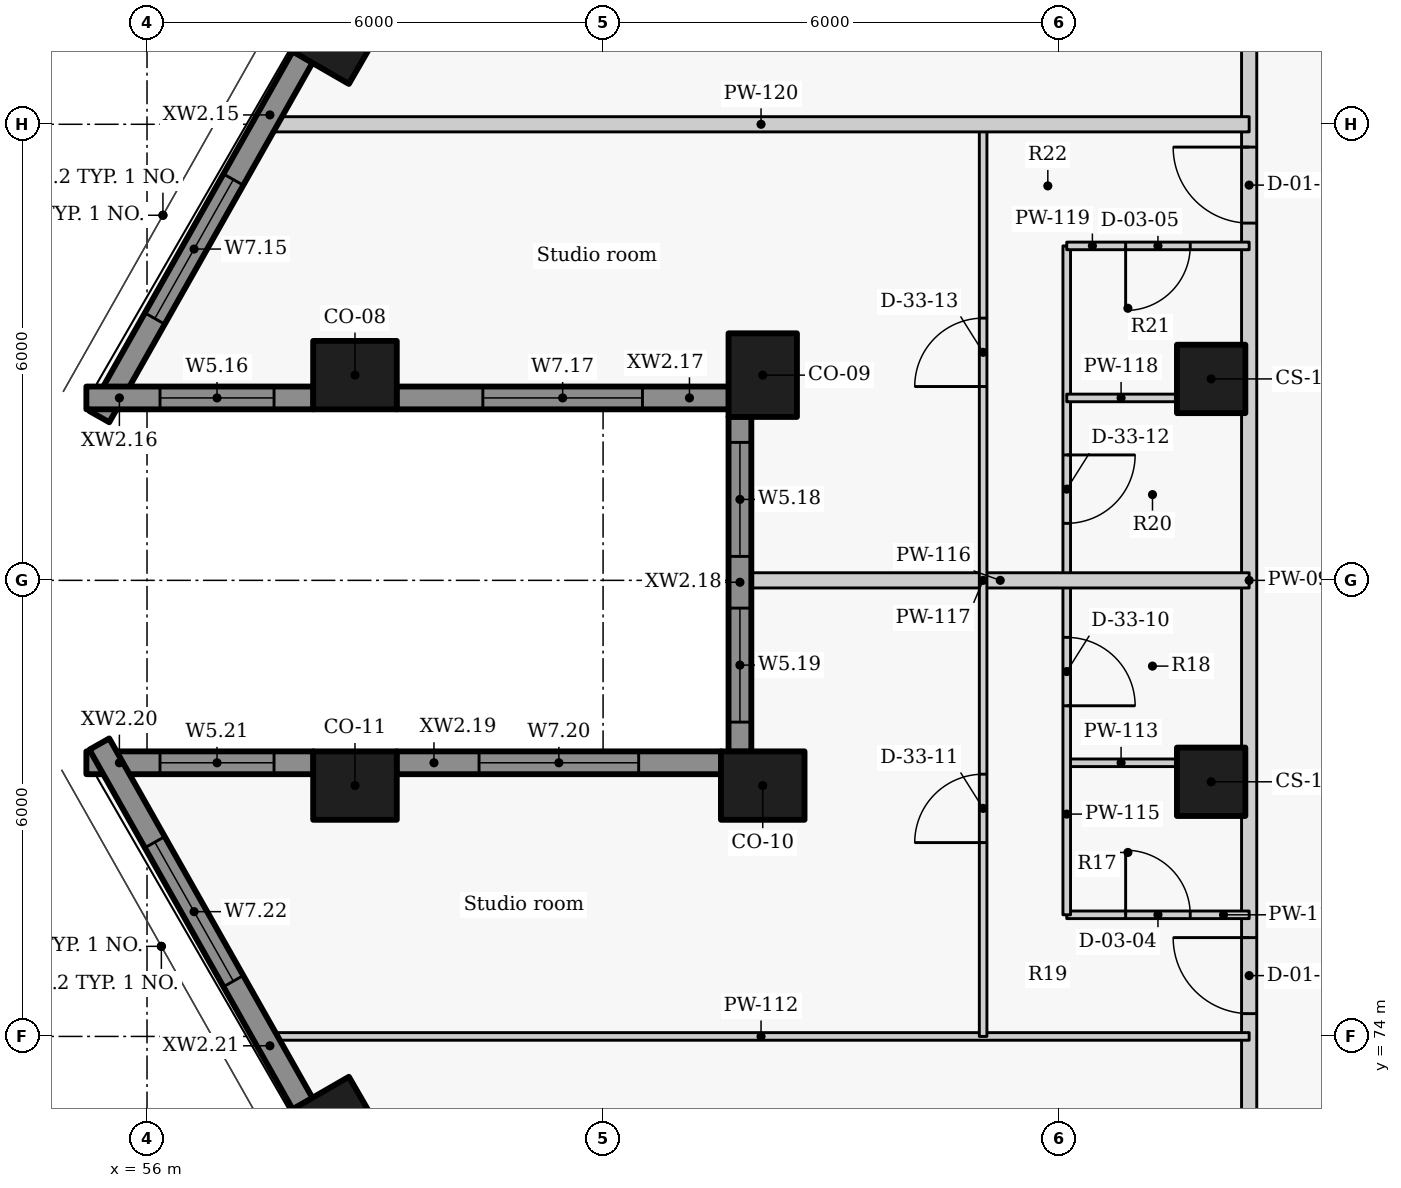
"""IFC4 building model, lengths in metres.
Left out: names, types, materials, properties, quantities, classifications, styles, units other than length and angle.
Written with IfcOpenShell. Run it as: python <this file> out.ifc"""

import sys

from ifc_helpers import new_model, si_unit, direction, frame, frame_2d, origin, origin_2d, place, context, subcontext, project, spatial, rectangle, extrude, element, fill, save


model = new_model("IFC4")
c1 = context("Model", 3, precision=1e-05, world=origin(), true_north=direction((0.0, 1.0)))
c2 = subcontext(c1, "Body", "Model", "MODEL_VIEW")
j1 = project(units=[si_unit("LENGTHUNIT", "METRE"), si_unit("PLANEANGLEUNIT", "RADIAN")], contexts=[c1])
p1 = place(None, origin())
s1 = spatial("IfcSite", under=j1, at=p1, CompositionType="ELEMENT")
p2 = place(p1, origin())
s2 = spatial("IfcBuilding", under=s1, at=p2, CompositionType="ELEMENT")
p3 = place(p2, frame((0.0, 0.0, 249.3)))
s3 = spatial("IfcBuildingStorey", under=s2, at=p3, CompositionType="ELEMENT", Elevation=249.3)
for number, where, z_axis, x_axis in (
    (1, (58.541, 87.232, 0.0), (0.0, 0.0, 1.0), (-0.5, -0.866, 0.0)),
    (2, (58.736, 82.7, 0.0), (0.0, 0.0, 1.0), (1.0, 0.0, 0.0)),
    (3, (64.101, 82.7, 0.0), (0.0, 0.0, 1.0), (0.0, -1.0, 0.0)),
    (4, (64.101, 77.3, 0.0), (0.0, 0.0, 1.0), (-1.0, 0.0, 0.0)),
    (5, (58.736, 77.3, 0.0), (0.0, 0.0, 1.0), (-1.0, 0.0, 0.0)),
    (6, (58.541, 72.768, 0.0), (0.0, 0.0, 1.0), (0.5, -0.866, 0.0)),
):
    element("IfcColumn", number, at=place(p3, frame(where, z_axis=z_axis, x_axis=x_axis)), inside=s3, PredefinedType="COLUMN", context=c2, shape_type="SweptSolid", body=[
        extrude(rectangle(XDim=1.1, YDim=0.9, at=origin_2d()), origin(), (0.0, 0.0, 1.0), 3.3),
    ])
for number, where, z_axis, x_axis in (
    (7, (70.0, 82.65, 0.0), (0.0, 0.0, 1.0), (0.0, -1.0, 0.0)),
    (8, (70.0, 77.35, 0.0), (0.0, 0.0, 1.0), (0.0, -1.0, 0.0)),
):
    element("IfcColumn", number, at=place(p3, frame(where, z_axis=z_axis, x_axis=x_axis)), inside=s3, PredefinedType="COLUMN", context=c2, shape_type="SweptSolid", body=[
        extrude(rectangle(XDim=0.9, YDim=0.9, at=origin_2d()), origin(), (0.0, 0.0, 1.0), 3.3),
    ])
p4 = place(p3, frame((58.048, 86.886, 0.0), z_axis=(0.0, 0.0, 1.0), x_axis=(-0.492080931903, -0.870549456641, 0.0)))
e9 = element("IfcWall", 9, at=p4, inside=s3, PredefinedType="SOLIDWALL", context=c2, shape_type="SweptSolid", body=[
    extrude(rectangle(XDim=5.437, YDim=0.3, at=frame_2d((2.718, 0.0))), origin(), (0.0, 0.0, 1.0), 2.425),
])
p5 = place(p4, frame((1.854, 0.0, 0.9)))
e10 = element("IfcOpeningElement", 10, at=p5, cuts=e9, PredefinedType="OPENING", context=c2, shape_type="SweptSolid", body=[
    extrude(rectangle(XDim=2.1, YDim=1.1, at=frame_2d((1.05, 0.55))), frame((0.0, 0.16, 0.0), z_axis=(0.0, -1.0, 0.0), x_axis=(1.0, 0.0, 0.0)), (0.0, 0.0, 1.0), 0.32),
])
p6 = place(p3, frame((55.202, 82.4, 0.0), z_axis=(0.0, 0.0, 1.0), x_axis=(1.0, 0.0, 0.0)))
e11 = element("IfcWall", 11, at=p6, inside=s3, PredefinedType="SOLIDWALL", context=c2, shape_type="SweptSolid", body=[
    extrude(rectangle(XDim=2.988, YDim=0.3, at=frame_2d((1.494, 0.0))), origin(), (0.0, 0.0, 1.0), 2.425),
])
p7 = place(p6, frame((0.969, 0.0, 0.9)))
e12 = element("IfcOpeningElement", 12, at=p7, cuts=e11, PredefinedType="OPENING", context=c2, shape_type="SweptSolid", body=[
    extrude(rectangle(XDim=1.5, YDim=1.1, at=frame_2d((0.75, 0.55))), frame((0.0, 0.16, 0.0), z_axis=(0.0, -1.0, 0.0), x_axis=(1.0, 0.0, 0.0)), (0.0, 0.0, 1.0), 0.32),
])
p8 = place(p3, frame((59.282, 82.4, 0.0), z_axis=(0.0, 0.0, 1.0), x_axis=(1.0, 0.0, 0.0)))
e13 = element("IfcWall", 13, at=p8, inside=s3, PredefinedType="SOLIDWALL", context=c2, shape_type="SweptSolid", body=[
    extrude(rectangle(XDim=4.373, YDim=0.3, at=frame_2d((2.186, 0.0))), origin(), (0.0, 0.0, 1.0), 2.425),
])
p9 = place(p8, frame((1.136, 0.0, 0.9)))
e14 = element("IfcOpeningElement", 14, at=p9, cuts=e13, PredefinedType="OPENING", context=c2, shape_type="SweptSolid", body=[
    extrude(rectangle(XDim=2.1, YDim=1.1, at=frame_2d((1.05, 0.55))), frame((0.0, 0.16, 0.0), z_axis=(0.0, -1.0, 0.0), x_axis=(1.0, 0.0, 0.0)), (0.0, 0.0, 1.0), 0.32),
])
p10 = place(p3, frame((63.801, 82.154, 0.0), z_axis=(0.0, 0.0, 1.0), x_axis=(0.0, -1.0, 0.0)))
e15 = element("IfcWall", 15, at=p10, inside=s3, PredefinedType="SOLIDWALL", context=c2, shape_type="SweptSolid", body=[
    extrude(rectangle(XDim=4.408, YDim=0.3, at=frame_2d((2.204, 0.0))), origin(), (0.0, 0.0, 1.0), 2.425),
])
p11 = place(p10, frame((0.339, 0.0, 0.9)))
e16 = element("IfcOpeningElement", 16, at=p11, cuts=e15, PredefinedType="OPENING", context=c2, shape_type="SweptSolid", body=[
    extrude(rectangle(XDim=1.5, YDim=1.1, at=frame_2d((0.75, 0.55))), frame((0.0, 0.16, 0.0), z_axis=(0.0, -1.0, 0.0), x_axis=(1.0, 0.0, 0.0)), (0.0, 0.0, 1.0), 0.32),
])
p12 = place(p10, frame((2.519, 0.0, 0.9)))
e17 = element("IfcOpeningElement", 17, at=p12, cuts=e15, PredefinedType="OPENING", context=c2, shape_type="SweptSolid", body=[
    extrude(rectangle(XDim=1.5, YDim=1.1, at=frame_2d((0.75, 0.55))), frame((0.0, 0.16, 0.0), z_axis=(0.0, -1.0, 0.0), x_axis=(1.0, 0.0, 0.0)), (0.0, 0.0, 1.0), 0.32),
])
p13 = place(p3, frame((63.554, 77.6, 0.0), z_axis=(0.0, 0.0, 1.0), x_axis=(-1.0, 0.0, 0.0)))
e18 = element("IfcWall", 18, at=p13, inside=s3, PredefinedType="SOLIDWALL", context=c2, shape_type="SweptSolid", body=[
    extrude(rectangle(XDim=4.272, YDim=0.3, at=frame_2d((2.136, 0.0))), origin(), (0.0, 0.0, 1.0), 2.425),
])
p14 = place(p13, frame((1.086, 0.0, 0.9)))
e19 = element("IfcOpeningElement", 19, at=p14, cuts=e18, PredefinedType="OPENING", context=c2, shape_type="SweptSolid", body=[
    extrude(rectangle(XDim=2.1, YDim=1.1, at=frame_2d((1.05, 0.55))), frame((0.0, 0.16, 0.0), z_axis=(0.0, -1.0, 0.0), x_axis=(1.0, 0.0, 0.0)), (0.0, 0.0, 1.0), 0.32),
])
p15 = place(p3, frame((58.19, 77.6, 0.0), z_axis=(0.0, 0.0, 1.0), x_axis=(-1.0, 0.0, 0.0)))
e20 = element("IfcWall", 20, at=p15, inside=s3, PredefinedType="SOLIDWALL", context=c2, shape_type="SweptSolid", body=[
    extrude(rectangle(XDim=2.988, YDim=0.3, at=frame_2d((1.494, 0.0))), origin(), (0.0, 0.0, 1.0), 2.425),
])
p16 = place(p15, frame((0.519, 0.0, 0.9)))
e21 = element("IfcOpeningElement", 21, at=p16, cuts=e20, PredefinedType="OPENING", context=c2, shape_type="SweptSolid", body=[
    extrude(rectangle(XDim=1.5, YDim=1.1, at=frame_2d((0.75, 0.55))), frame((0.0, 0.16, 0.0), z_axis=(0.0, -1.0, 0.0), x_axis=(1.0, 0.0, 0.0)), (0.0, 0.0, 1.0), 0.32),
])
p17 = place(p3, frame((55.373, 77.846, 0.0), z_axis=(0.0, 0.0, 1.0), x_axis=(0.492080931903, -0.870549456641, 0.0)))
e22 = element("IfcWall", 22, at=p17, inside=s3, PredefinedType="SOLIDWALL", context=c2, shape_type="SweptSolid", body=[
    extrude(rectangle(XDim=5.437, YDim=0.3, at=frame_2d((2.718, 0.0))), origin(), (0.0, 0.0, 1.0), 2.425),
])
p18 = place(p17, frame((1.483, 0.0, 0.9)))
e23 = element("IfcOpeningElement", 23, at=p18, cuts=e22, PredefinedType="OPENING", context=c2, shape_type="SweptSolid", body=[
    extrude(rectangle(XDim=2.1, YDim=1.1, at=frame_2d((1.05, 0.55))), frame((0.0, 0.16, 0.0), z_axis=(0.0, -1.0, 0.0), x_axis=(1.0, 0.0, 0.0)), (0.0, 0.0, 1.0), 0.32),
])
p19 = place(p3, frame((70.5, 72.577, 0.0), z_axis=(0.0, 0.0, 1.0), x_axis=(0.0, 1.0, 0.0)))
e24 = element("IfcWall", 24, at=p19, inside=s3, PredefinedType="PARTITIONING", context=c2, shape_type="SweptSolid", body=[
    extrude(rectangle(XDim=15.786, YDim=0.2, at=frame_2d((7.893, 0.0))), origin(), (0.0, 0.0, 1.0), 3.025),
])
p20 = place(p19, frame((1.723, 0.0, 0.0)))
e25 = element("IfcOpeningElement", 25, at=p20, cuts=e24, PredefinedType="OPENING", context=c2, shape_type="SweptSolid", body=[
    extrude(rectangle(XDim=1.0, YDim=2.1, at=frame_2d((0.5, 1.05))), frame((0.0, 0.11, 0.0), z_axis=(0.0, -1.0, 0.0), x_axis=(1.0, 0.0, 0.0)), (0.0, 0.0, 1.0), 0.22),
])
p21 = place(p19, frame((12.123, 0.0, 0.0)))
e26 = element("IfcOpeningElement", 26, at=p21, cuts=e24, PredefinedType="OPENING", context=c2, shape_type="SweptSolid", body=[
    extrude(rectangle(XDim=1.0, YDim=2.1, at=frame_2d((0.5, 1.05))), frame((0.0, 0.11, 0.0), z_axis=(0.0, -1.0, 0.0), x_axis=(1.0, 0.0, 0.0)), (0.0, 0.0, 1.0), 0.22),
])
p22 = place(p3, frame((57.656, 74.0, 0.0), z_axis=(0.0, 0.0, 1.0), x_axis=(1.0, 0.0, 0.0)))
e27 = element("IfcWall", 27, at=p22, inside=s3, PredefinedType="PARTITIONING", context=c2, shape_type="SweptSolid", body=[
    extrude(rectangle(XDim=12.844, YDim=0.1, at=frame_2d((6.422, 0.0))), origin(), (0.0, 0.0, 1.0), 2.405),
])
p23 = place(p3, frame((68.1, 77.6, 0.0), z_axis=(0.0, 0.0, 1.0), x_axis=(1.0, 0.0, 0.0)))
e28 = element("IfcWall", 28, at=p23, inside=s3, PredefinedType="PARTITIONING", context=c2, shape_type="SweptSolid", body=[
    extrude(rectangle(XDim=1.43, YDim=0.1, at=frame_2d((0.715, 0.0))), origin(), (0.0, 0.0, 1.0), 3.025),
])
p24 = place(p3, frame((68.1, 75.6, 0.0), z_axis=(0.0, 0.0, 1.0), x_axis=(1.0, 0.0, 0.0)))
e29 = element("IfcWall", 29, at=p24, inside=s3, PredefinedType="PARTITIONING", context=c2, shape_type="SweptSolid", body=[
    extrude(rectangle(XDim=2.4, YDim=0.1, at=frame_2d((1.2, 0.0))), origin(), (0.0, 0.0, 1.0), 2.505),
])
p25 = place(p24, frame((0.775, 0.0, 0.0)))
e30 = element("IfcOpeningElement", 30, at=p25, cuts=e29, PredefinedType="OPENING", context=c2, shape_type="SweptSolid", body=[
    extrude(rectangle(XDim=0.85, YDim=2.1, at=frame_2d((0.425, 1.05))), frame((0.0, 0.06, 0.0), z_axis=(0.0, -1.0, 0.0), x_axis=(1.0, 0.0, 0.0)), (0.0, 0.0, 1.0), 0.12),
])
p26 = place(p3, frame((68.1, 84.4, 0.0), z_axis=(0.0, 0.0, 1.0), x_axis=(0.0, -1.0, 0.0)))
e31 = element("IfcWall", 31, at=p26, inside=s3, PredefinedType="PARTITIONING", context=c2, shape_type="SweptSolid", body=[
    extrude(rectangle(XDim=8.8, YDim=0.1, at=frame_2d((4.4, 0.0))), origin(), (0.0, 0.0, 1.0), 3.025),
])
p27 = place(p26, frame((5.15, 0.0, 0.0)))
e32 = element("IfcOpeningElement", 32, at=p27, cuts=e31, PredefinedType="OPENING", context=c2, shape_type="SweptSolid", body=[
    extrude(rectangle(XDim=0.9, YDim=2.1, at=frame_2d((0.45, 1.05))), frame((0.0, 0.06, 0.0), z_axis=(0.0, -1.0, 0.0), x_axis=(1.0, 0.0, 0.0)), (0.0, 0.0, 1.0), 0.12),
])
p28 = place(p26, frame((2.75, 0.0, 0.0)))
e33 = element("IfcOpeningElement", 33, at=p28, cuts=e31, PredefinedType="OPENING", context=c2, shape_type="SweptSolid", body=[
    extrude(rectangle(XDim=0.9, YDim=2.1, at=frame_2d((0.45, 1.05))), frame((0.0, 0.06, 0.0), z_axis=(0.0, -1.0, 0.0), x_axis=(1.0, 0.0, 0.0)), (0.0, 0.0, 1.0), 0.12),
])
p29 = place(p3, frame((63.95, 80.0, 0.0), z_axis=(0.0, 0.0, 1.0), x_axis=(1.0, 0.0, 0.0)))
e34 = element("IfcWall", 34, at=p29, inside=s3, PredefinedType="PARTITIONING", context=c2, shape_type="SweptSolid", body=[
    extrude(rectangle(XDim=6.55, YDim=0.2, at=frame_2d((3.275, 0.0))), origin(), (0.0, 0.0, 1.0), 2.405),
])
p30 = place(p3, frame((67.0, 74.0, 0.0), z_axis=(0.0, 0.0, 1.0), x_axis=(0.0, 1.0, 0.0)))
e35 = element("IfcWall", 35, at=p30, inside=s3, PredefinedType="PARTITIONING", context=c2, shape_type="SweptSolid", body=[
    extrude(rectangle(XDim=12.0, YDim=0.1, at=frame_2d((6.0, 0.0))), origin(), (0.0, 0.0, 1.0), 3.025),
])
p31 = place(p30, frame((2.55, 0.0, 0.0)))
e36 = element("IfcOpeningElement", 36, at=p31, cuts=e35, PredefinedType="OPENING", context=c2, shape_type="SweptSolid", body=[
    extrude(rectangle(XDim=0.9, YDim=2.1, at=frame_2d((0.45, 1.05))), frame((0.0, 0.06, 0.0), z_axis=(0.0, -1.0, 0.0), x_axis=(1.0, 0.0, 0.0)), (0.0, 0.0, 1.0), 0.12),
])
p32 = place(p30, frame((8.55, 0.0, 0.0)))
e37 = element("IfcOpeningElement", 37, at=p32, cuts=e35, PredefinedType="OPENING", context=c2, shape_type="SweptSolid", body=[
    extrude(rectangle(XDim=0.9, YDim=2.1, at=frame_2d((0.45, 1.05))), frame((0.0, 0.06, 0.0), z_axis=(0.0, -1.0, 0.0), x_axis=(1.0, 0.0, 0.0)), (0.0, 0.0, 1.0), 0.12),
])
p33 = place(p3, frame((68.1, 82.4, 0.0), z_axis=(0.0, 0.0, 1.0), x_axis=(1.0, 0.0, 0.0)))
e38 = element("IfcWall", 38, at=p33, inside=s3, PredefinedType="PARTITIONING", context=c2, shape_type="SweptSolid", body=[
    extrude(rectangle(XDim=1.43, YDim=0.1, at=frame_2d((0.715, 0.0))), origin(), (0.0, 0.0, 1.0), 3.025),
])
p34 = place(p3, frame((70.5, 84.4, 0.0), z_axis=(0.0, 0.0, 1.0), x_axis=(-1.0, 0.0, 0.0)))
e39 = element("IfcWall", 39, at=p34, inside=s3, PredefinedType="PARTITIONING", context=c2, shape_type="SweptSolid", body=[
    extrude(rectangle(XDim=2.4, YDim=0.1, at=frame_2d((1.2, 0.0))), origin(), (0.0, 0.0, 1.0), 2.505),
])
p35 = place(p34, frame((0.775, 0.0, 0.0)))
e40 = element("IfcOpeningElement", 40, at=p35, cuts=e39, PredefinedType="OPENING", context=c2, shape_type="SweptSolid", body=[
    extrude(rectangle(XDim=0.85, YDim=2.1, at=frame_2d((0.425, 1.05))), frame((0.0, 0.06, 0.0), z_axis=(0.0, -1.0, 0.0), x_axis=(1.0, 0.0, 0.0)), (0.0, 0.0, 1.0), 0.12),
])
p36 = place(p3, frame((57.656, 86.0, 0.0), z_axis=(0.0, 0.0, 1.0), x_axis=(1.0, 0.0, 0.0)))
e41 = element("IfcWall", 41, at=p36, inside=s3, PredefinedType="PARTITIONING", context=c2, shape_type="SweptSolid", body=[
    extrude(rectangle(XDim=12.844, YDim=0.2, at=frame_2d((6.422, 0.0))), origin(), (0.0, 0.0, 1.0), 2.405),
])
p37 = place(p5, origin())
e42 = element("IfcWindow", 42, at=p37, inside=s3, PartitioningType="SINGLE_PANEL", PredefinedType="WINDOW", context=c2, shape_type="SweptSolid", body=[
    extrude(rectangle(XDim=2.1, YDim=1.1, at=frame_2d((1.05, 0.55))), frame((0.0, 0.03, 0.0), z_axis=(0.0, -1.0, 0.0), x_axis=(1.0, 0.0, 0.0)), (0.0, 0.0, 1.0), 0.06),
])
fill(e10, e42)
p38 = place(p7, origin())
e43 = element("IfcWindow", 43, at=p38, inside=s3, PartitioningType="SINGLE_PANEL", PredefinedType="WINDOW", context=c2, shape_type="SweptSolid", body=[
    extrude(rectangle(XDim=1.5, YDim=1.1, at=frame_2d((0.75, 0.55))), frame((0.0, 0.03, 0.0), z_axis=(0.0, -1.0, 0.0), x_axis=(1.0, 0.0, 0.0)), (0.0, 0.0, 1.0), 0.06),
])
fill(e12, e43)
p39 = place(p9, origin())
e44 = element("IfcWindow", 44, at=p39, inside=s3, PartitioningType="SINGLE_PANEL", PredefinedType="WINDOW", context=c2, shape_type="SweptSolid", body=[
    extrude(rectangle(XDim=2.1, YDim=1.1, at=frame_2d((1.05, 0.55))), frame((0.0, 0.03, 0.0), z_axis=(0.0, -1.0, 0.0), x_axis=(1.0, 0.0, 0.0)), (0.0, 0.0, 1.0), 0.06),
])
fill(e14, e44)
p40 = place(p11, origin())
e45 = element("IfcWindow", 45, at=p40, inside=s3, PartitioningType="SINGLE_PANEL", PredefinedType="WINDOW", context=c2, shape_type="SweptSolid", body=[
    extrude(rectangle(XDim=1.5, YDim=1.1, at=frame_2d((0.75, 0.55))), frame((0.0, 0.03, 0.0), z_axis=(0.0, -1.0, 0.0), x_axis=(1.0, 0.0, 0.0)), (0.0, 0.0, 1.0), 0.06),
])
fill(e16, e45)
p41 = place(p12, origin())
e46 = element("IfcWindow", 46, at=p41, inside=s3, PartitioningType="SINGLE_PANEL", PredefinedType="WINDOW", context=c2, shape_type="SweptSolid", body=[
    extrude(rectangle(XDim=1.5, YDim=1.1, at=frame_2d((0.75, 0.55))), frame((0.0, 0.03, 0.0), z_axis=(0.0, -1.0, 0.0), x_axis=(1.0, 0.0, 0.0)), (0.0, 0.0, 1.0), 0.06),
])
fill(e17, e46)
p42 = place(p14, origin())
e47 = element("IfcWindow", 47, at=p42, inside=s3, PartitioningType="SINGLE_PANEL", PredefinedType="WINDOW", context=c2, shape_type="SweptSolid", body=[
    extrude(rectangle(XDim=2.1, YDim=1.1, at=frame_2d((1.05, 0.55))), frame((0.0, 0.03, 0.0), z_axis=(0.0, -1.0, 0.0), x_axis=(1.0, 0.0, 0.0)), (0.0, 0.0, 1.0), 0.06),
])
fill(e19, e47)
p43 = place(p16, origin())
e48 = element("IfcWindow", 48, at=p43, inside=s3, PartitioningType="SINGLE_PANEL", PredefinedType="WINDOW", context=c2, shape_type="SweptSolid", body=[
    extrude(rectangle(XDim=1.5, YDim=1.1, at=frame_2d((0.75, 0.55))), frame((0.0, 0.03, 0.0), z_axis=(0.0, -1.0, 0.0), x_axis=(1.0, 0.0, 0.0)), (0.0, 0.0, 1.0), 0.06),
])
fill(e21, e48)
p44 = place(p18, origin())
e49 = element("IfcWindow", 49, at=p44, inside=s3, PartitioningType="SINGLE_PANEL", PredefinedType="WINDOW", context=c2, shape_type="SweptSolid", body=[
    extrude(rectangle(XDim=2.1, YDim=1.1, at=frame_2d((1.05, 0.55))), frame((0.0, 0.03, 0.0), z_axis=(0.0, -1.0, 0.0), x_axis=(1.0, 0.0, 0.0)), (0.0, 0.0, 1.0), 0.06),
])
fill(e23, e49)
p45 = place(p20, origin())
e50 = element("IfcDoor", 50, at=p45, inside=s3, OperationType="SINGLE_SWING_RIGHT", PredefinedType="DOOR", context=c2, shape_type="SweptSolid", body=[
    extrude(rectangle(XDim=1.0, YDim=2.1, at=frame_2d((0.5, 1.05))), frame((0.0, 0.025, 0.0), z_axis=(0.0, -1.0, 0.0), x_axis=(1.0, 0.0, 0.0)), (0.0, 0.0, 1.0), 0.05),
])
fill(e25, e50)
p46 = place(p25, origin())
e51 = element("IfcDoor", 51, at=p46, inside=s3, OperationType="SINGLE_SWING_LEFT", PredefinedType="DOOR", context=c2, shape_type="SweptSolid", body=[
    extrude(rectangle(XDim=0.85, YDim=2.1, at=frame_2d((0.425, 1.05))), frame((0.0, 0.025, 0.0), z_axis=(0.0, -1.0, 0.0), x_axis=(1.0, 0.0, 0.0)), (0.0, 0.0, 1.0), 0.05),
])
fill(e30, e51)
p47 = place(p27, origin())
e52 = element("IfcDoor", 52, at=p47, inside=s3, OperationType="SINGLE_SWING_RIGHT", PredefinedType="DOOR", context=c2, shape_type="SweptSolid", body=[
    extrude(rectangle(XDim=0.9, YDim=2.1, at=frame_2d((0.45, 1.05))), frame((0.0, 0.025, 0.0), z_axis=(0.0, -1.0, 0.0), x_axis=(1.0, 0.0, 0.0)), (0.0, 0.0, 1.0), 0.05),
])
fill(e32, e52)
p48 = place(p31, origin())
e53 = element("IfcDoor", 53, at=p48, inside=s3, OperationType="SINGLE_SWING_LEFT", PredefinedType="DOOR", context=c2, shape_type="SweptSolid", body=[
    extrude(rectangle(XDim=0.9, YDim=2.1, at=frame_2d((0.45, 1.05))), frame((0.0, 0.025, 0.0), z_axis=(0.0, -1.0, 0.0), x_axis=(1.0, 0.0, 0.0)), (0.0, 0.0, 1.0), 0.05),
])
fill(e36, e53)
p49 = place(p21, origin())
e54 = element("IfcDoor", 54, at=p49, inside=s3, OperationType="SINGLE_SWING_RIGHT", PredefinedType="DOOR", context=c2, shape_type="SweptSolid", body=[
    extrude(rectangle(XDim=1.0, YDim=2.1, at=frame_2d((0.5, 1.05))), frame((0.0, 0.025, 0.0), z_axis=(0.0, -1.0, 0.0), x_axis=(1.0, 0.0, 0.0)), (0.0, 0.0, 1.0), 0.05),
])
fill(e26, e54)
p50 = place(p28, origin())
e55 = element("IfcDoor", 55, at=p50, inside=s3, OperationType="SINGLE_SWING_LEFT", PredefinedType="DOOR", context=c2, shape_type="SweptSolid", body=[
    extrude(rectangle(XDim=0.9, YDim=2.1, at=frame_2d((0.45, 1.05))), frame((0.0, 0.025, 0.0), z_axis=(0.0, -1.0, 0.0), x_axis=(1.0, 0.0, 0.0)), (0.0, 0.0, 1.0), 0.05),
])
fill(e33, e55)
p51 = place(p35, origin())
e56 = element("IfcDoor", 56, at=p51, inside=s3, OperationType="SINGLE_SWING_RIGHT", PredefinedType="DOOR", context=c2, shape_type="SweptSolid", body=[
    extrude(rectangle(XDim=0.85, YDim=2.1, at=frame_2d((0.425, 1.05))), frame((0.0, 0.025, 0.0), z_axis=(0.0, -1.0, 0.0), x_axis=(1.0, 0.0, 0.0)), (0.0, 0.0, 1.0), 0.05),
])
fill(e40, e56)
p52 = place(p32, origin())
e57 = element("IfcDoor", 57, at=p52, inside=s3, OperationType="SINGLE_SWING_LEFT", PredefinedType="DOOR", context=c2, shape_type="SweptSolid", body=[
    extrude(rectangle(XDim=0.9, YDim=2.1, at=frame_2d((0.45, 1.05))), frame((0.0, 0.025, 0.0), z_axis=(0.0, -1.0, 0.0), x_axis=(1.0, 0.0, 0.0)), (0.0, 0.0, 1.0), 0.05),
])
fill(e37, e57)
save(model, sys.argv[1])
